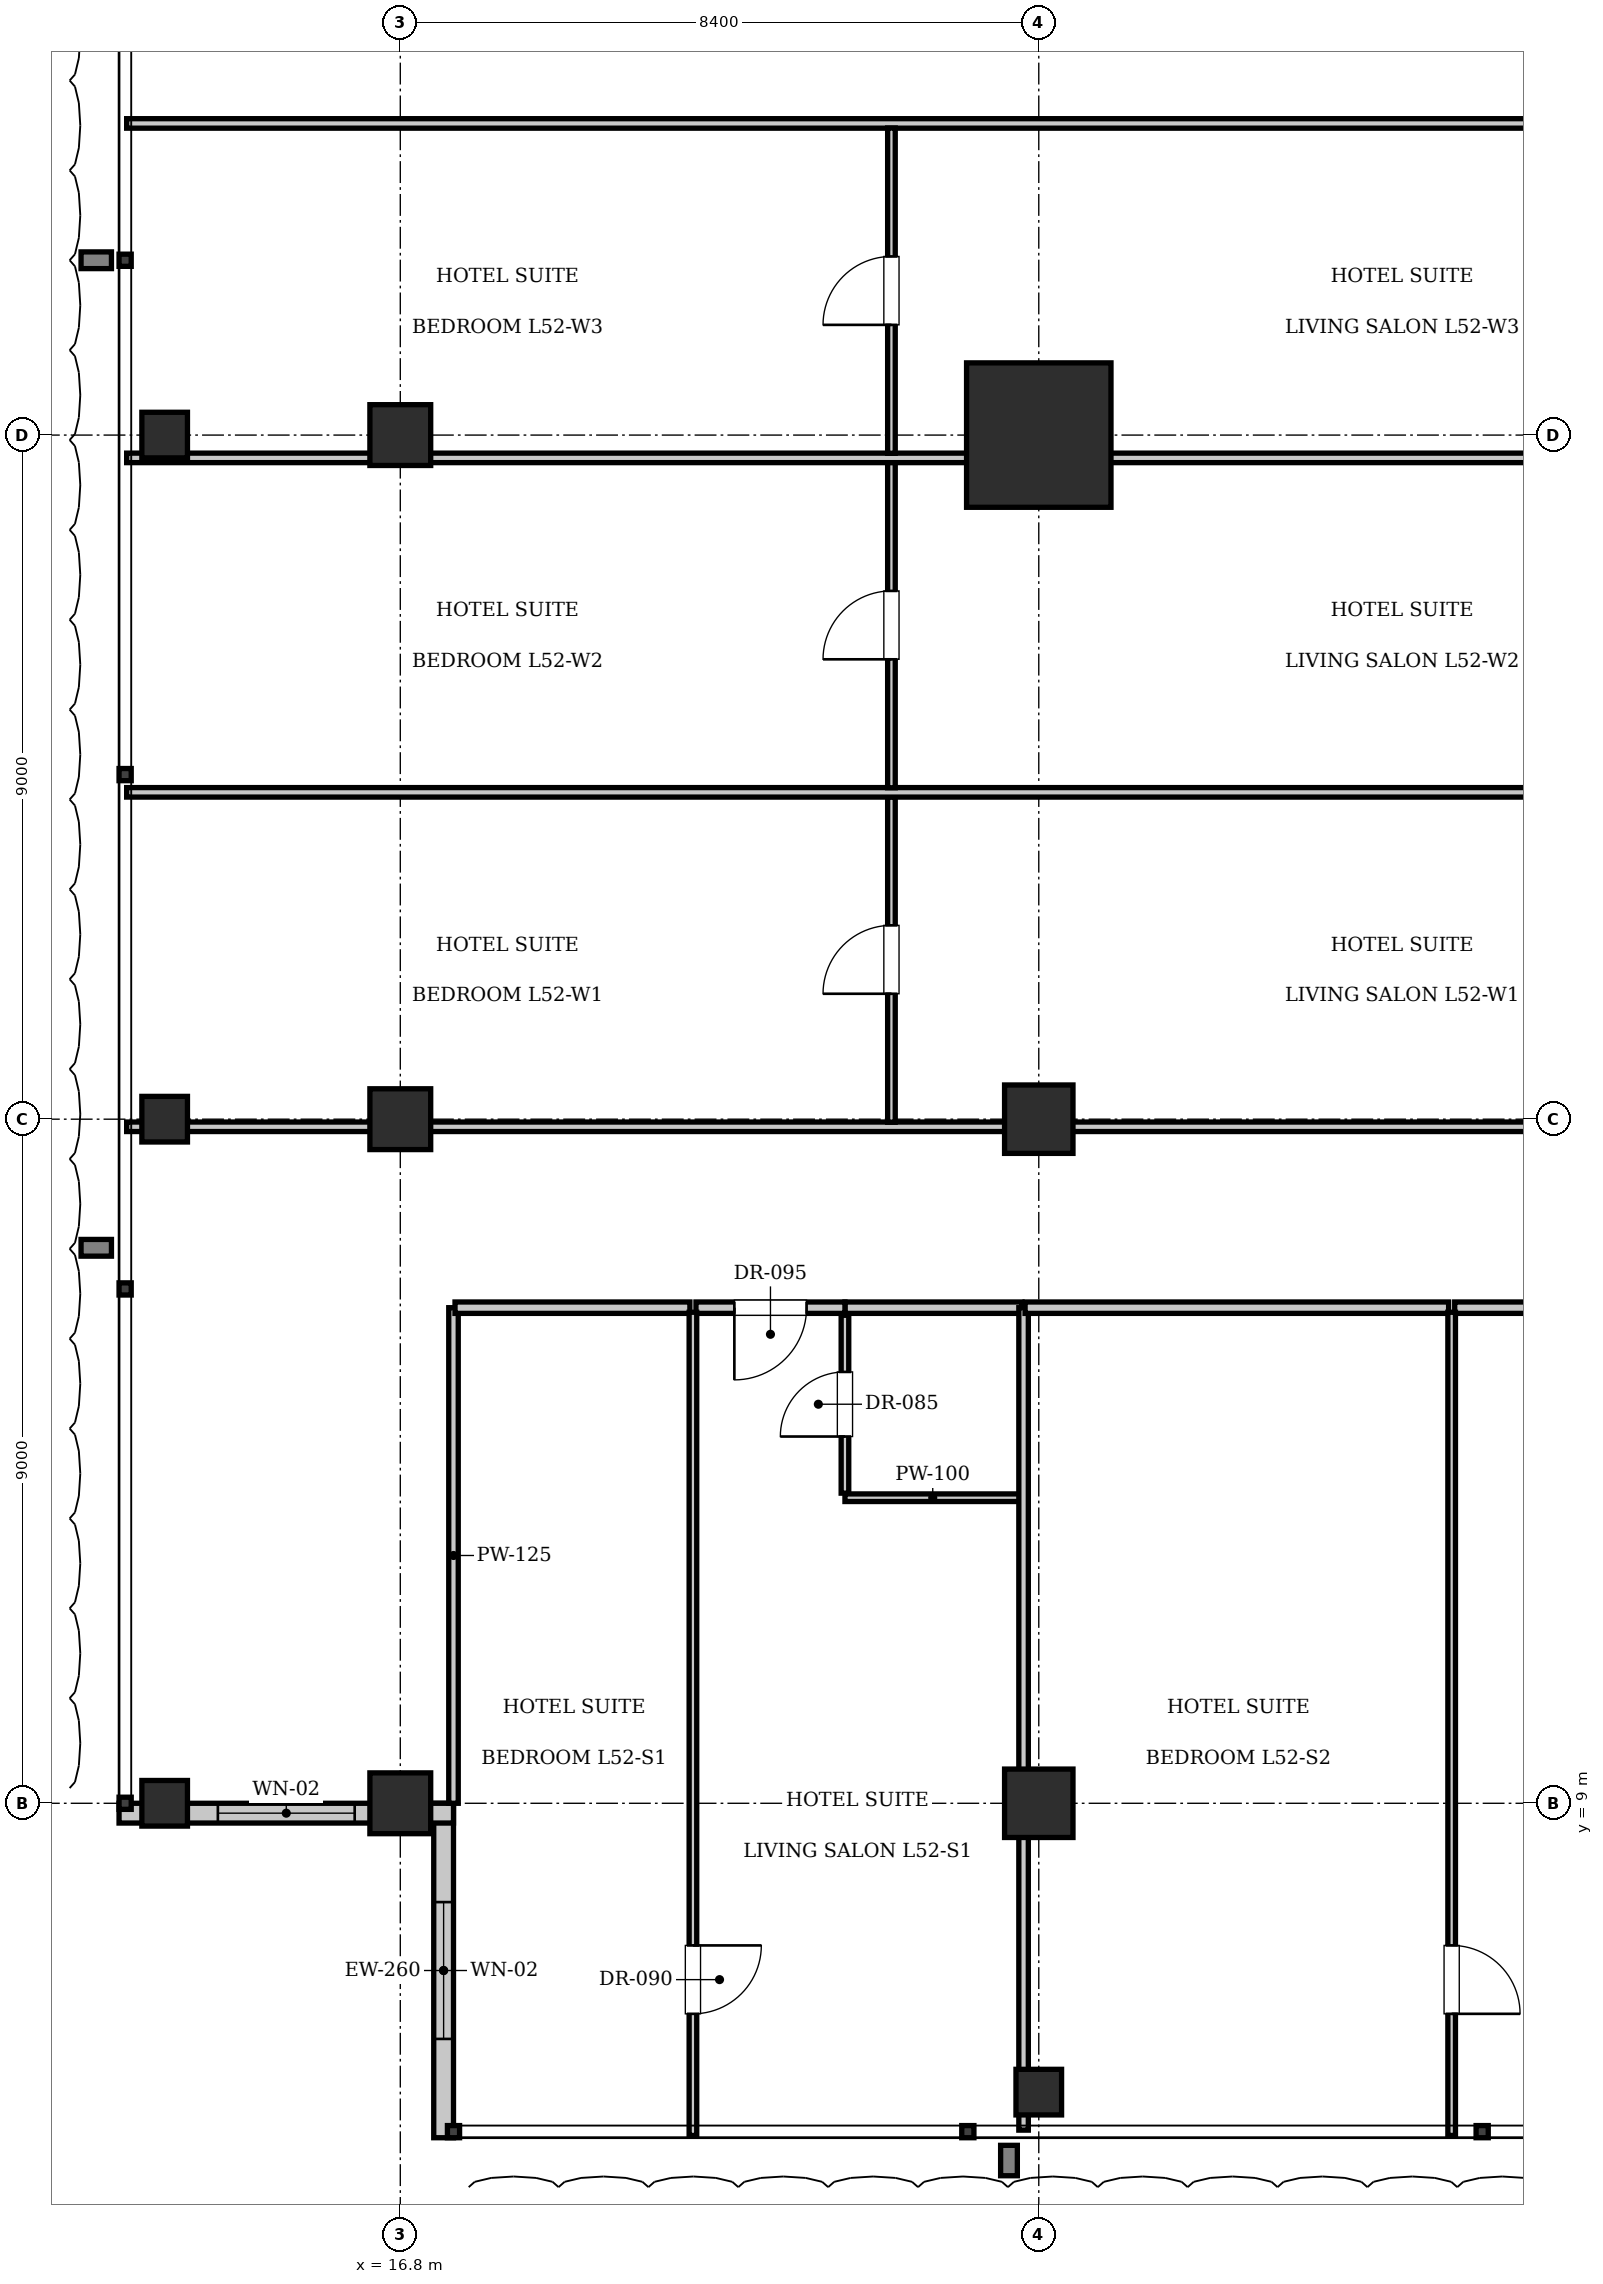
"""IFC4 building model, lengths in metres.
Left out: names, types, materials, properties, quantities, classifications, styles, units other than length and angle.
Written with IfcOpenShell. Run it as: python <this file> out.ifc"""

import sys

from ifc_helpers import new_model, si_unit, direction, frame, frame_2d, origin, origin_2d, place, context, subcontext, project, spatial, rectangle, i_section, extrude, element, fill, save


model = new_model("IFC4")
c1 = context("Model", 3, precision=1e-05, world=origin(), true_north=direction((0.0, 1.0)))
c2 = subcontext(c1, "Body", "Model", "MODEL_VIEW")
j1 = project(units=[si_unit("LENGTHUNIT", "METRE"), si_unit("PLANEANGLEUNIT", "RADIAN")], contexts=[c1])
p1 = place(None, origin())
s1 = spatial("IfcSite", under=j1, at=p1, CompositionType="ELEMENT")
p2 = place(p1, origin())
s2 = spatial("IfcBuilding", under=s1, at=p2, CompositionType="ELEMENT")
p3 = place(p2, frame((0.0, 0.0, 212.1)))
s3 = spatial("IfcBuildingStorey", under=s2, at=p3, CompositionType="ELEMENT", Elevation=212.1)
p4 = place(p3, frame((25.2, 27.0, 0.0), z_axis=(0.0, 0.0, 1.0), x_axis=(1.0, 0.0, 0.0)))
e1 = element("IfcColumn", 1, at=p4, inside=s3, PredefinedType="COLUMN", context=c2, shape_type="SweptSolid", body=[
    extrude(rectangle(XDim=1.9, YDim=1.9, at=origin_2d()), origin(), (0.0, 0.0, 1.0), 3.85),
])
for number, where, z_axis, x_axis in (
    (2, (25.2, 18.0, 0.0), (0.0, 0.0, 1.0), (1.0, 0.0, 0.0)),
    (3, (25.2, 9.0, 0.0), (0.0, 0.0, 1.0), (1.0, 0.0, 0.0)),
):
    element("IfcColumn", number, at=place(p3, frame(where, z_axis=z_axis, x_axis=x_axis)), inside=s3, PredefinedType="COLUMN", context=c2, shape_type="SweptSolid", body=[
        extrude(rectangle(XDim=0.9, YDim=0.9, at=origin_2d()), origin(), (0.0, 0.0, 1.0), 3.85),
    ])
for number, where, z_axis, x_axis in (
    (4, (16.8, 9.0, 0.0), (0.0, 0.0, 1.0), (1.0, 0.0, 0.0)),
    (5, (16.8, 18.0, 0.0), (0.0, 0.0, 1.0), (1.0, 0.0, 0.0)),
    (6, (16.8, 27.0, 0.0), (0.0, 0.0, 1.0), (1.0, 0.0, 0.0)),
):
    element("IfcColumn", number, at=place(p3, frame(where, z_axis=z_axis, x_axis=x_axis)), inside=s3, PredefinedType="COLUMN", context=c2, shape_type="SweptSolid", body=[
        extrude(rectangle(XDim=0.8, YDim=0.8, at=origin_2d()), origin(), (0.0, 0.0, 1.0), 3.85),
    ])
for number, where, z_axis, x_axis in (
    (7, (13.7, 9.0, 0.0), (0.0, 0.0, 1.0), (1.0, 0.0, 0.0)),
    (8, (13.7, 18.0, 0.0), (0.0, 0.0, 1.0), (1.0, 0.0, 0.0)),
    (9, (13.7, 27.0, 0.0), (0.0, 0.0, 1.0), (1.0, 0.0, 0.0)),
    (10, (25.2, 5.2, 0.0), (0.0, 0.0, 1.0), (1.0, 0.0, 0.0)),
):
    element("IfcColumn", number, at=place(p3, frame(where, z_axis=z_axis, x_axis=x_axis)), inside=s3, PredefinedType="COLUMN", context=c2, shape_type="SweptSolid", body=[
        extrude(i_section(OverallWidth=0.6, OverallDepth=0.6, WebThickness=0.025, FlangeThickness=0.038, at=origin_2d()), origin(), (0.0, 0.0, 1.0), 3.85),
    ])
p5 = place(p3, frame((17.37, 4.6, 0.0), z_axis=(0.0, 0.0, 1.0), x_axis=(0.0, 1.0, 0.0)))
e11 = element("IfcWall", 11, at=p5, inside=s3, PredefinedType="SOLIDWALL", context=c2, shape_type="SweptSolid", body=[
    extrude(rectangle(XDim=4.4, YDim=0.26, at=frame_2d((2.2, 0.0))), origin(), (0.0, 0.0, 1.0), 3.61),
])
p6 = place(p5, frame((1.3, 0.0, 0.9)))
e12 = element("IfcOpeningElement", 12, at=p6, cuts=e11, PredefinedType="OPENING", context=c2, shape_type="SweptSolid", body=[
    extrude(rectangle(XDim=1.8, YDim=2.1, at=frame_2d((0.9, 1.05))), frame((0.0, 0.14, 0.0), z_axis=(0.0, -1.0, 0.0), x_axis=(1.0, 0.0, 0.0)), (0.0, 0.0, 1.0), 0.28),
])
p7 = place(p3, frame((17.5, 8.87, 0.0), z_axis=(0.0, 0.0, 1.0), x_axis=(-1.0, 0.0, 0.0)))
e13 = element("IfcWall", 13, at=p7, inside=s3, PredefinedType="SOLIDWALL", context=c2, shape_type="SweptSolid", body=[
    extrude(rectangle(XDim=4.4, YDim=0.26, at=frame_2d((2.2, 0.0))), origin(), (0.0, 0.0, 1.0), 3.071),
])
p8 = place(p7, frame((1.3, 0.0, 0.9)))
e14 = element("IfcOpeningElement", 14, at=p8, cuts=e13, PredefinedType="OPENING", context=c2, shape_type="SweptSolid", body=[
    extrude(rectangle(XDim=1.8, YDim=2.1, at=frame_2d((0.9, 1.05))), frame((0.0, 0.14, 0.0), z_axis=(0.0, -1.0, 0.0), x_axis=(1.0, 0.0, 0.0)), (0.0, 0.0, 1.0), 0.28),
])
p9 = place(p3, frame((17.5, 9.0, 0.0), z_axis=(0.0, 0.0, 1.0), x_axis=(0.0, 1.0, 0.0)))
e15 = element("IfcWall", 15, at=p9, inside=s3, PredefinedType="PARTITIONING", context=c2, shape_type="SweptSolid", body=[
    extrude(rectangle(XDim=6.52, YDim=0.125, at=frame_2d((3.26, 0.0))), origin(), (0.0, 0.0, 1.0), 3.61),
])
p10 = place(p3, frame((22.65, 15.52, 0.0), z_axis=(0.0, 0.0, 1.0), x_axis=(1.0, 0.0, 0.0)))
e16 = element("IfcWall", 16, at=p10, inside=s3, PredefinedType="PARTITIONING", context=c2, shape_type="SweptSolid", body=[
    extrude(rectangle(XDim=2.33, YDim=0.15, at=frame_2d((1.165, 0.0))), origin(), (0.0, 0.0, 1.0), 3.61),
])
p11 = place(p3, frame((22.65, 13.02, 0.0), z_axis=(0.0, 0.0, 1.0), x_axis=(1.0, 0.0, 0.0)))
e17 = element("IfcWall", 17, at=p11, inside=s3, PredefinedType="PARTITIONING", context=c2, shape_type="SweptSolid", body=[
    extrude(rectangle(XDim=2.31, YDim=0.1, at=frame_2d((1.155, 0.0))), origin(), (0.0, 0.0, 1.0), 3.61),
])
p12 = place(p3, frame((22.65, 13.08, 0.0), z_axis=(0.0, 0.0, 1.0), x_axis=(0.0, 1.0, 0.0)))
e18 = element("IfcWall", 18, at=p12, inside=s3, PredefinedType="PARTITIONING", context=c2, shape_type="SweptSolid", body=[
    extrude(rectangle(XDim=2.34, YDim=0.1, at=frame_2d((1.17, 0.0))), origin(), (0.0, 0.0, 1.0), 3.61),
])
p13 = place(p12, frame((0.745, 0.0, 0.0)))
e19 = element("IfcOpeningElement", 19, at=p13, cuts=e18, PredefinedType="OPENING", context=c2, shape_type="SweptSolid", body=[
    extrude(rectangle(XDim=0.85, YDim=2.1, at=frame_2d((0.425, 1.05))), frame((0.0, 0.06, 0.0), z_axis=(0.0, -1.0, 0.0), x_axis=(1.0, 0.0, 0.0)), (0.0, 0.0, 1.0), 0.12),
])
p14 = place(p3, frame((17.52, 15.52, 0.0), z_axis=(0.0, 0.0, 1.0), x_axis=(1.0, 0.0, 0.0)))
e20 = element("IfcWall", 20, at=p14, inside=s3, PredefinedType="PARTITIONING", context=c2, shape_type="SweptSolid", body=[
    extrude(rectangle(XDim=3.09, YDim=0.15, at=frame_2d((1.545, 0.0))), origin(), (0.0, 0.0, 1.0), 3.61),
])
p15 = place(p3, frame((20.69, 15.52, 0.0), z_axis=(0.0, 0.0, 1.0), x_axis=(1.0, 0.0, 0.0)))
e21 = element("IfcWall", 21, at=p15, inside=s3, PredefinedType="PARTITIONING", context=c2, shape_type="SweptSolid", body=[
    extrude(rectangle(XDim=1.96, YDim=0.15, at=frame_2d((0.98, 0.0))), origin(), (0.0, 0.0, 1.0), 3.61),
])
p16 = place(p15, frame((0.505, 0.0, 0.0)))
e22 = element("IfcOpeningElement", 22, at=p16, cuts=e21, PredefinedType="OPENING", context=c2, shape_type="SweptSolid", body=[
    extrude(rectangle(XDim=0.95, YDim=2.15, at=frame_2d((0.475, 1.075))), frame((0.0, 0.085, 0.0), z_axis=(0.0, -1.0, 0.0), x_axis=(1.0, 0.0, 0.0)), (0.0, 0.0, 1.0), 0.17),
])
p17 = place(p3, frame((20.65, 4.63, 0.0), z_axis=(0.0, 0.0, 1.0), x_axis=(0.0, 1.0, 0.0)))
e23 = element("IfcWall", 23, at=p17, inside=s3, PredefinedType="PARTITIONING", context=c2, shape_type="SweptSolid", body=[
    extrude(rectangle(XDim=10.83, YDim=0.1, at=frame_2d((5.415, 0.0))), origin(), (0.0, 0.0, 1.0), 3.61),
])
p18 = place(p17, frame((1.6, 0.0, 0.0)))
e24 = element("IfcOpeningElement", 24, at=p18, cuts=e23, PredefinedType="OPENING", context=c2, shape_type="SweptSolid", body=[
    extrude(rectangle(XDim=0.9, YDim=2.1, at=frame_2d((0.45, 1.05))), frame((0.0, 0.06, 0.0), z_axis=(0.0, -1.0, 0.0), x_axis=(1.0, 0.0, 0.0)), (0.0, 0.0, 1.0), 0.12),
])
p19 = place(p3, frame((25.0, 4.7, 0.0), z_axis=(0.0, 0.0, 1.0), x_axis=(0.0, 1.0, 0.0)))
e25 = element("IfcWall", 25, at=p19, inside=s3, PredefinedType="PARTITIONING", context=c2, shape_type="SweptSolid", body=[
    extrude(rectangle(XDim=10.82, YDim=0.125, at=frame_2d((5.41, 0.0))), origin(), (0.0, 0.0, 1.0), 3.61),
])
p20 = place(p3, frame((25.02, 15.52, 0.0), z_axis=(0.0, 0.0, 1.0), x_axis=(1.0, 0.0, 0.0)))
e26 = element("IfcWall", 26, at=p20, inside=s3, PredefinedType="PARTITIONING", context=c2, shape_type="SweptSolid", body=[
    extrude(rectangle(XDim=5.572, YDim=0.15, at=frame_2d((2.786, 0.0))), origin(), (0.0, 0.0, 1.0), 3.61),
])
p21 = place(p3, frame((30.672, 15.52, 0.0), z_axis=(0.0, 0.0, 1.0), x_axis=(1.0, 0.0, 0.0)))
e27 = element("IfcWall", 27, at=p21, inside=s3, PredefinedType="PARTITIONING", context=c2, shape_type="SweptSolid", body=[
    extrude(rectangle(XDim=4.778, YDim=0.15, at=frame_2d((2.389, 0.0))), origin(), (0.0, 0.0, 1.0), 3.61),
])
p22 = place(p21, frame((1.914, 0.0, 0.0)))
e28 = element("IfcOpeningElement", 28, at=p22, cuts=e27, PredefinedType="OPENING", context=c2, shape_type="SweptSolid", body=[
    extrude(rectangle(XDim=0.95, YDim=2.15, at=frame_2d((0.475, 1.075))), frame((0.0, 0.085, 0.0), z_axis=(0.0, -1.0, 0.0), x_axis=(1.0, 0.0, 0.0)), (0.0, 0.0, 1.0), 0.17),
])
p23 = place(p3, frame((30.632, 4.63, 0.0), z_axis=(0.0, 0.0, 1.0), x_axis=(0.0, 1.0, 0.0)))
e29 = element("IfcWall", 29, at=p23, inside=s3, PredefinedType="PARTITIONING", context=c2, shape_type="SweptSolid", body=[
    extrude(rectangle(XDim=10.83, YDim=0.1, at=frame_2d((5.415, 0.0))), origin(), (0.0, 0.0, 1.0), 3.61),
])
p24 = place(p23, frame((1.6, 0.0, 0.0)))
e30 = element("IfcOpeningElement", 30, at=p24, cuts=e29, PredefinedType="OPENING", context=c2, shape_type="SweptSolid", body=[
    extrude(rectangle(XDim=0.9, YDim=2.1, at=frame_2d((0.45, 1.05))), frame((0.0, 0.06, 0.0), z_axis=(0.0, -1.0, 0.0), x_axis=(1.0, 0.0, 0.0)), (0.0, 0.0, 1.0), 0.12),
])
p25 = place(p3, frame((13.2, 17.9, 0.0), z_axis=(0.0, 0.0, 1.0), x_axis=(1.0, 0.0, 0.0)))
e31 = element("IfcWall", 31, at=p25, inside=s3, PredefinedType="PARTITIONING", context=c2, shape_type="SweptSolid", body=[
    extrude(rectangle(XDim=23.52, YDim=0.125, at=frame_2d((11.76, 0.0))), origin(), (0.0, 0.0, 1.0), 3.071),
])
p26 = place(p3, frame((13.2, 31.1, 0.0), z_axis=(0.0, 0.0, 1.0), x_axis=(1.0, 0.0, 0.0)))
e32 = element("IfcWall", 32, at=p26, inside=s3, PredefinedType="PARTITIONING", context=c2, shape_type="SweptSolid", body=[
    extrude(rectangle(XDim=23.52, YDim=0.125, at=frame_2d((11.76, 0.0))), origin(), (0.0, 0.0, 1.0), 3.61),
])
p27 = place(p3, frame((23.262, 17.96, 0.0), z_axis=(0.0, 0.0, 1.0), x_axis=(0.0, 1.0, 0.0)))
e33 = element("IfcWall", 33, at=p27, inside=s3, PredefinedType="PARTITIONING", context=c2, shape_type="SweptSolid", body=[
    extrude(rectangle(XDim=4.28, YDim=0.1, at=frame_2d((2.14, 0.0))), origin(), (0.0, 0.0, 1.0), 3.61),
])
p28 = place(p27, frame((1.69, 0.0, 0.0)))
e34 = element("IfcOpeningElement", 34, at=p28, cuts=e33, PredefinedType="OPENING", context=c2, shape_type="SweptSolid", body=[
    extrude(rectangle(XDim=0.9, YDim=2.1, at=frame_2d((0.45, 1.05))), frame((0.0, 0.06, 0.0), z_axis=(0.0, -1.0, 0.0), x_axis=(1.0, 0.0, 0.0)), (0.0, 0.0, 1.0), 0.12),
])
p29 = place(p3, frame((13.2, 22.3, 0.0), z_axis=(0.0, 0.0, 1.0), x_axis=(1.0, 0.0, 0.0)))
e35 = element("IfcWall", 35, at=p29, inside=s3, PredefinedType="PARTITIONING", context=c2, shape_type="SweptSolid", body=[
    extrude(rectangle(XDim=23.52, YDim=0.125, at=frame_2d((11.76, 0.0))), origin(), (0.0, 0.0, 1.0), 3.61),
])
p30 = place(p3, frame((23.262, 22.36, 0.0), z_axis=(0.0, 0.0, 1.0), x_axis=(0.0, 1.0, 0.0)))
e36 = element("IfcWall", 36, at=p30, inside=s3, PredefinedType="PARTITIONING", context=c2, shape_type="SweptSolid", body=[
    extrude(rectangle(XDim=4.28, YDim=0.1, at=frame_2d((2.14, 0.0))), origin(), (0.0, 0.0, 1.0), 3.61),
])
p31 = place(p30, frame((1.69, 0.0, 0.0)))
e37 = element("IfcOpeningElement", 37, at=p31, cuts=e36, PredefinedType="OPENING", context=c2, shape_type="SweptSolid", body=[
    extrude(rectangle(XDim=0.9, YDim=2.1, at=frame_2d((0.45, 1.05))), frame((0.0, 0.06, 0.0), z_axis=(0.0, -1.0, 0.0), x_axis=(1.0, 0.0, 0.0)), (0.0, 0.0, 1.0), 0.12),
])
p32 = place(p3, frame((13.2, 26.7, 0.0), z_axis=(0.0, 0.0, 1.0), x_axis=(1.0, 0.0, 0.0)))
e38 = element("IfcWall", 38, at=p32, inside=s3, PredefinedType="PARTITIONING", context=c2, shape_type="SweptSolid", body=[
    extrude(rectangle(XDim=23.52, YDim=0.125, at=frame_2d((11.76, 0.0))), origin(), (0.0, 0.0, 1.0), 3.61),
])
p33 = place(p3, frame((23.262, 26.76, 0.0), z_axis=(0.0, 0.0, 1.0), x_axis=(0.0, 1.0, 0.0)))
e39 = element("IfcWall", 39, at=p33, inside=s3, PredefinedType="PARTITIONING", context=c2, shape_type="SweptSolid", body=[
    extrude(rectangle(XDim=4.28, YDim=0.1, at=frame_2d((2.14, 0.0))), origin(), (0.0, 0.0, 1.0), 3.61),
])
p34 = place(p33, frame((1.69, 0.0, 0.0)))
e40 = element("IfcOpeningElement", 40, at=p34, cuts=e39, PredefinedType="OPENING", context=c2, shape_type="SweptSolid", body=[
    extrude(rectangle(XDim=0.9, YDim=2.1, at=frame_2d((0.45, 1.05))), frame((0.0, 0.06, 0.0), z_axis=(0.0, -1.0, 0.0), x_axis=(1.0, 0.0, 0.0)), (0.0, 0.0, 1.0), 0.12),
])
p35 = place(p6, origin())
e41 = element("IfcWindow", 41, at=p35, inside=s3, PartitioningType="SINGLE_PANEL", PredefinedType="WINDOW", context=c2, shape_type="SweptSolid", body=[
    extrude(rectangle(XDim=1.8, YDim=2.1, at=frame_2d((0.9, 1.05))), frame((0.0, 0.03, 0.0), z_axis=(0.0, -1.0, 0.0), x_axis=(1.0, 0.0, 0.0)), (0.0, 0.0, 1.0), 0.06),
])
fill(e12, e41)
p36 = place(p8, origin())
e42 = element("IfcWindow", 42, at=p36, inside=s3, PartitioningType="SINGLE_PANEL", PredefinedType="WINDOW", context=c2, shape_type="SweptSolid", body=[
    extrude(rectangle(XDim=1.8, YDim=2.1, at=frame_2d((0.9, 1.05))), frame((0.0, 0.03, 0.0), z_axis=(0.0, -1.0, 0.0), x_axis=(1.0, 0.0, 0.0)), (0.0, 0.0, 1.0), 0.06),
])
fill(e14, e42)
p37 = place(p13, origin())
e43 = element("IfcDoor", 43, at=p37, inside=s3, OperationType="SINGLE_SWING_LEFT", PredefinedType="DOOR", context=c2, shape_type="SweptSolid", body=[
    extrude(rectangle(XDim=0.85, YDim=2.1, at=frame_2d((0.425, 1.05))), frame((0.0, 0.025, 0.0), z_axis=(0.0, -1.0, 0.0), x_axis=(1.0, 0.0, 0.0)), (0.0, 0.0, 1.0), 0.05),
])
fill(e19, e43)
p38 = place(p16, frame((0.95, 0.0, 0.0), z_axis=(0.0, 0.0, 1.0), x_axis=(-1.0, 0.0, 0.0)))
e44 = element("IfcDoor", 44, at=p38, inside=s3, OperationType="SINGLE_SWING_RIGHT", PredefinedType="DOOR", context=c2, shape_type="SweptSolid", body=[
    extrude(rectangle(XDim=0.95, YDim=2.15, at=frame_2d((0.475, 1.075))), frame((0.0, 0.025, 0.0), z_axis=(0.0, -1.0, 0.0), x_axis=(1.0, 0.0, 0.0)), (0.0, 0.0, 1.0), 0.05),
])
fill(e22, e44)
p39 = place(p18, frame((0.9, 0.0, 0.0), z_axis=(0.0, 0.0, 1.0), x_axis=(-1.0, 0.0, 0.0)))
e45 = element("IfcDoor", 45, at=p39, inside=s3, OperationType="SINGLE_SWING_LEFT", PredefinedType="DOOR", context=c2, shape_type="SweptSolid", body=[
    extrude(rectangle(XDim=0.9, YDim=2.1, at=frame_2d((0.45, 1.05))), frame((0.0, 0.025, 0.0), z_axis=(0.0, -1.0, 0.0), x_axis=(1.0, 0.0, 0.0)), (0.0, 0.0, 1.0), 0.05),
])
fill(e24, e45)
p40 = place(p24, frame((0.9, 0.0, 0.0), z_axis=(0.0, 0.0, 1.0), x_axis=(-1.0, 0.0, 0.0)))
e46 = element("IfcDoor", 46, at=p40, inside=s3, OperationType="SINGLE_SWING_RIGHT", PredefinedType="DOOR", context=c2, shape_type="SweptSolid", body=[
    extrude(rectangle(XDim=0.9, YDim=2.1, at=frame_2d((0.45, 1.05))), frame((0.0, 0.025, 0.0), z_axis=(0.0, -1.0, 0.0), x_axis=(1.0, 0.0, 0.0)), (0.0, 0.0, 1.0), 0.05),
])
fill(e30, e46)
p41 = place(p28, origin())
e47 = element("IfcDoor", 47, at=p41, inside=s3, OperationType="SINGLE_SWING_LEFT", PredefinedType="DOOR", context=c2, shape_type="SweptSolid", body=[
    extrude(rectangle(XDim=0.9, YDim=2.1, at=frame_2d((0.45, 1.05))), frame((0.0, 0.025, 0.0), z_axis=(0.0, -1.0, 0.0), x_axis=(1.0, 0.0, 0.0)), (0.0, 0.0, 1.0), 0.05),
])
fill(e34, e47)
p42 = place(p31, origin())
e48 = element("IfcDoor", 48, at=p42, inside=s3, OperationType="SINGLE_SWING_LEFT", PredefinedType="DOOR", context=c2, shape_type="SweptSolid", body=[
    extrude(rectangle(XDim=0.9, YDim=2.1, at=frame_2d((0.45, 1.05))), frame((0.0, 0.025, 0.0), z_axis=(0.0, -1.0, 0.0), x_axis=(1.0, 0.0, 0.0)), (0.0, 0.0, 1.0), 0.05),
])
fill(e37, e48)
p43 = place(p34, origin())
e49 = element("IfcDoor", 49, at=p43, inside=s3, OperationType="SINGLE_SWING_LEFT", PredefinedType="DOOR", context=c2, shape_type="SweptSolid", body=[
    extrude(rectangle(XDim=0.9, YDim=2.1, at=frame_2d((0.45, 1.05))), frame((0.0, 0.025, 0.0), z_axis=(0.0, -1.0, 0.0), x_axis=(1.0, 0.0, 0.0)), (0.0, 0.0, 1.0), 0.05),
])
fill(e40, e49)
save(model, sys.argv[1])
